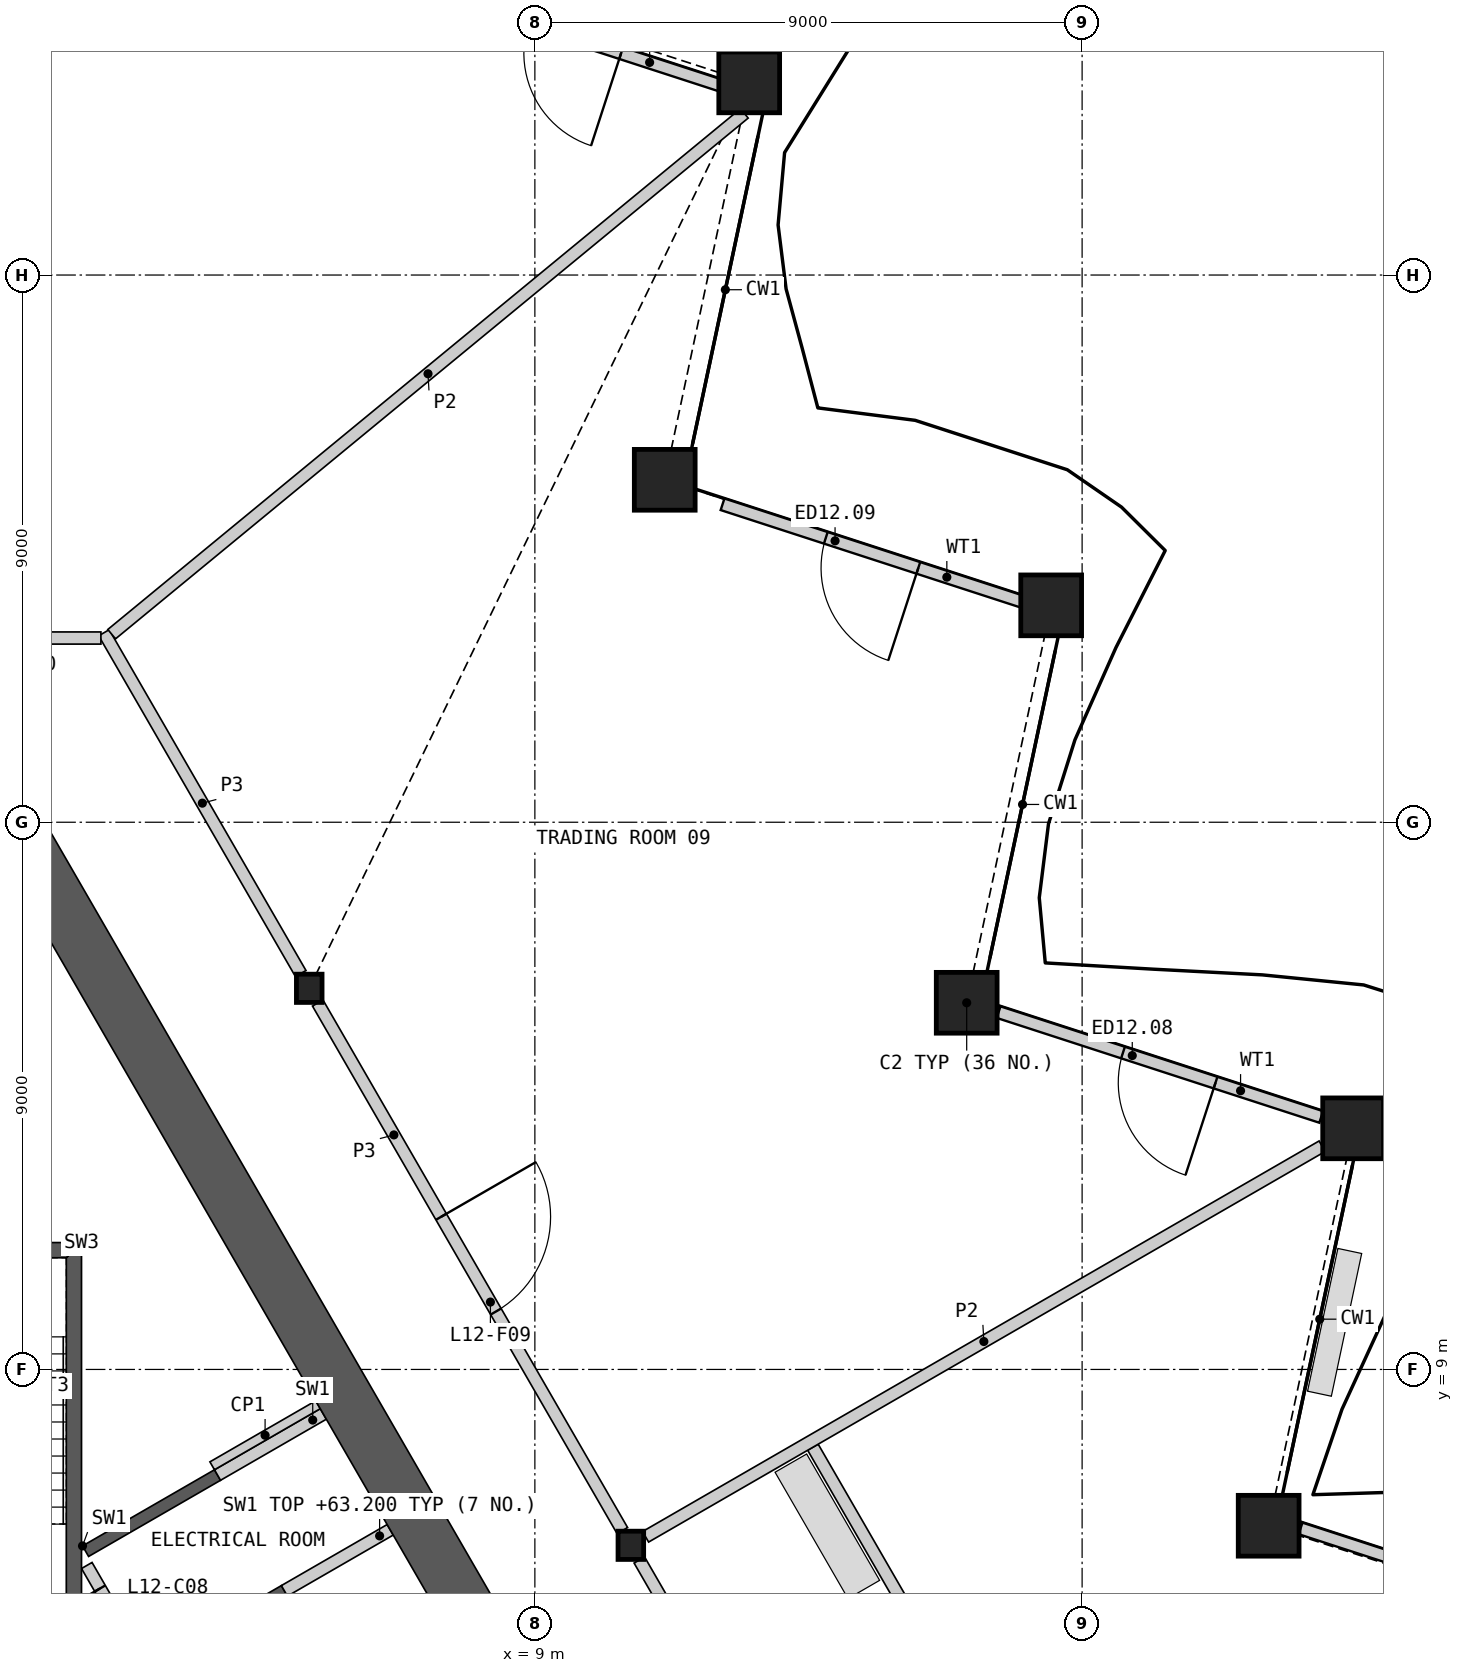
"""IFC4 building model, lengths in metres.
Left out: names, types, materials, properties, quantities, classifications, styles, units other than length and angle.
Written with IfcOpenShell. Run it as: python <this file> out.ifc"""

import sys

from ifc_helpers import new_model, si_unit, direction, frame, frame_2d, origin, origin_2d, place, context, subcontext, project, spatial, polyline, rectangle, hollow_rectangle, i_section, outline, extrude, element, fill, save


model = new_model("IFC4")
c1 = context("Model", 3, precision=1e-05, world=origin(), true_north=direction((0.0, 1.0)))
c2 = subcontext(c1, "Body", "Model", "MODEL_VIEW")
j1 = project(units=[si_unit("LENGTHUNIT", "METRE"), si_unit("PLANEANGLEUNIT", "RADIAN")], contexts=[c1])
p1 = place(None, origin())
s1 = spatial("IfcSite", under=j1, at=p1, CompositionType="ELEMENT")
p2 = place(p1, origin())
s2 = spatial("IfcBuilding", under=s1, at=p2, CompositionType="ELEMENT")
p3 = place(p2, frame((0.0, 0.0, 59.4)))
s3 = spatial("IfcBuildingStorey", under=s2, at=p3, CompositionType="ELEMENT", Elevation=59.4)
for number, where, z_axis, x_axis in (
    (1, (21.068, 6.429, 0.0), (0.0, 0.0, 1.0), (1.0, 0.0, 0.0)),
    (2, (22.457, 12.966, 0.0), (0.0, 0.0, 1.0), (1.0, 0.0, 0.0)),
    (3, (16.102, 15.031, 0.0), (0.0, 0.0, 1.0), (1.0, 0.0, 0.0)),
    (4, (17.491, 21.567, 0.0), (0.0, 0.0, 1.0), (1.0, 0.0, 0.0)),
    (5, (11.136, 23.632, 0.0), (0.0, 0.0, 1.0), (1.0, 0.0, 0.0)),
    (6, (12.525, 30.169, 0.0), (0.0, 0.0, 1.0), (1.0, 0.0, 0.0)),
):
    element("IfcColumn", number, at=place(p3, frame(where, z_axis=z_axis, x_axis=x_axis)), inside=s3, PredefinedType="COLUMN", context=c2, shape_type="SweptSolid", body=[
        extrude(hollow_rectangle(XDim=1.0, YDim=1.0, WallThickness=0.07, at=origin_2d()), origin(), (0.0, 0.0, 1.0), 4.2),
    ])
for number, where, z_axis, x_axis in (
    (7, (10.578, 6.107, 0.0), (0.0, 0.0, 1.0), (1.0, 0.0, 0.0)),
    (8, (5.289, 15.269, 0.0), (0.0, 0.0, 1.0), (1.0, 0.0, 0.0)),
):
    element("IfcColumn", number, at=place(p3, frame(where, z_axis=z_axis, x_axis=x_axis)), inside=s3, PredefinedType="COLUMN", context=c2, shape_type="SweptSolid", body=[
        extrude(i_section(OverallWidth=0.421, OverallDepth=0.465, WebThickness=0.045, FlangeThickness=0.072, at=origin_2d()), origin(), (0.0, 0.0, 1.0), 4.2),
    ])
p4 = place(p3, frame((26.899, 4.661, 0.0), z_axis=(0.0, 0.0, 1.0), x_axis=(-0.951054004345, 0.309024725255, 0.0)))
e9 = element("IfcWall", 9, at=p4, inside=s3, PredefinedType="SOLIDWALL", context=c2, shape_type="SweptSolid", body=[
    extrude(rectangle(XDim=5.579, YDim=0.2, at=frame_2d((2.79, 0.0))), origin(), (0.0, 0.0, 1.0), 3.189),
])
p5 = place(p4, frame((1.91, 0.0, 0.0)))
e10 = element("IfcOpeningElement", 10, at=p5, cuts=e9, PredefinedType="OPENING", context=c2, shape_type="SweptSolid", body=[
    extrude(rectangle(XDim=1.6, YDim=2.4, at=frame_2d((0.8, 1.2))), frame((0.0, 0.11, 0.0), z_axis=(0.0, -1.0, 0.0), x_axis=(1.0, 0.0, 0.0)), (0.0, 0.0, 1.0), 0.22),
])
p6 = place(p3, frame((21.933, 13.153, 0.0), z_axis=(0.0, 0.0, 1.0), x_axis=(-0.951066864375, 0.308985144444, 0.0)))
e11 = element("IfcWall", 11, at=p6, inside=s3, PredefinedType="SOLIDWALL", context=c2, shape_type="SweptSolid", body=[
    extrude(rectangle(XDim=5.579, YDim=0.2, at=frame_2d((2.79, 0.0))), origin(), (0.0, 0.0, 1.0), 3.189),
])
p7 = place(p6, frame((1.828, 0.0, 0.0)))
e12 = element("IfcOpeningElement", 12, at=p7, cuts=e11, PredefinedType="OPENING", context=c2, shape_type="SweptSolid", body=[
    extrude(rectangle(XDim=1.6, YDim=2.4, at=frame_2d((0.8, 1.2))), frame((0.0, 0.11, 0.0), z_axis=(0.0, -1.0, 0.0), x_axis=(1.0, 0.0, 0.0)), (0.0, 0.0, 1.0), 0.22),
])
p8 = place(p3, frame((17.005, 21.631, 0.0), z_axis=(0.0, 0.0, 1.0), x_axis=(-0.951045170621, 0.309051910588, 0.0)))
e13 = element("IfcWall", 13, at=p8, inside=s3, PredefinedType="SOLIDWALL", context=c2, shape_type="SweptSolid", body=[
    extrude(rectangle(XDim=5.171, YDim=0.2, at=frame_2d((2.585, 0.0))), origin(), (0.0, 0.0, 1.0), 3.189),
])
p9 = place(p8, frame((1.786, 0.0, 0.0)))
e14 = element("IfcOpeningElement", 14, at=p9, cuts=e13, PredefinedType="OPENING", context=c2, shape_type="SweptSolid", body=[
    extrude(rectangle(XDim=1.6, YDim=2.4, at=frame_2d((0.8, 1.2))), frame((0.0, 0.11, 0.0), z_axis=(0.0, -1.0, 0.0), x_axis=(1.0, 0.0, 0.0)), (0.0, 0.0, 1.0), 0.22),
])
p10 = place(p3, frame((12.117, 30.097, 0.0), z_axis=(0.0, 0.0, 1.0), x_axis=(-0.951063554534, 0.308995332064, 0.0)))
e15 = element("IfcWall", 15, at=p10, inside=s3, PredefinedType="SOLIDWALL", context=c2, shape_type="SweptSolid", body=[
    extrude(rectangle(XDim=5.171, YDim=0.2, at=frame_2d((2.586, 0.0))), origin(), (0.0, 0.0, 1.0), 3.189),
])
p11 = place(p10, frame((1.786, 0.0, 0.0)))
e16 = element("IfcOpeningElement", 16, at=p11, cuts=e15, PredefinedType="OPENING", context=c2, shape_type="SweptSolid", body=[
    extrude(rectangle(XDim=1.6, YDim=2.4, at=frame_2d((0.8, 1.2))), frame((0.0, 0.11, 0.0), z_axis=(0.0, -1.0, 0.0), x_axis=(1.0, 0.0, 0.0)), (0.0, 0.0, 1.0), 0.22),
])
p12 = place(p3, origin())
e17 = element("IfcWall", 17, at=p12, inside=s3, PredefinedType="SHEAR", context=c2, shape_type="SweptSolid", body=[
    extrude(outline(polyline([(1.561, 6.097), (3.731, 7.35), (3.831, 7.177), (1.66, 5.924), (1.561, 6.097)])), origin(), (0.0, 0.0, 1.0), 3.8),
])
p13 = place(p3, origin())
e18 = element("IfcWall", 18, at=p13, inside=s3, PredefinedType="SHEAR", context=c2, shape_type="SweptSolid", body=[
    extrude(outline(polyline([(2.66, 4.192), (4.831, 5.445), (8.231, -0.444), (6.061, -1.697), (5.96, -1.524), (7.952, -0.374), (6.952, 1.358), (4.96, 0.208), (4.861, 0.381), (6.852, 1.531), (5.852, 3.263), (3.861, 2.113), (3.76, 2.287), (5.752, 3.437), (4.752, 5.169), (2.76, 4.019), (2.66, 4.192)])), origin(), (0.0, 0.0, 1.0), 3.8),
])
p14 = place(p3, frame((5.817, -1.476, 0.0), z_axis=(0.0, 0.0, 1.0), x_axis=(-0.500002616675, 0.866023893041, 0.0)))
e19 = element("IfcWall", 19, at=p14, inside=s3, PredefinedType="SOLIDWALL", context=c2, shape_type="SweptSolid", body=[
    extrude(rectangle(XDim=8.373, YDim=0.2, at=frame_2d((4.187, 0.0))), origin(), (0.0, 0.0, 1.0), 3.8),
])
p15 = place(p14, frame((0.337, 0.0, 0.0)))
e20 = element("IfcOpeningElement", 20, at=p15, cuts=e19, PredefinedType="OPENING", context=c2, shape_type="SweptSolid", body=[
    extrude(rectangle(XDim=1.1, YDim=2.1, at=frame_2d((0.55, 1.05))), frame((0.0, 0.11, 0.0), z_axis=(0.0, -1.0, 0.0), x_axis=(1.0, 0.0, 0.0)), (0.0, 0.0, 1.0), 0.22),
])
p16 = place(p14, frame((2.537, 0.0, 0.0)))
e21 = element("IfcOpeningElement", 21, at=p16, cuts=e19, PredefinedType="OPENING", context=c2, shape_type="SweptSolid", body=[
    extrude(rectangle(XDim=1.1, YDim=2.1, at=frame_2d((0.55, 1.05))), frame((0.0, 0.11, 0.0), z_axis=(0.0, -1.0, 0.0), x_axis=(1.0, 0.0, 0.0)), (0.0, 0.0, 1.0), 0.22),
])
p17 = place(p14, frame((4.737, 0.0, 0.0)))
e22 = element("IfcOpeningElement", 22, at=p17, cuts=e19, PredefinedType="OPENING", context=c2, shape_type="SweptSolid", body=[
    extrude(rectangle(XDim=1.1, YDim=2.1, at=frame_2d((0.55, 1.05))), frame((0.0, 0.11, 0.0), z_axis=(0.0, -1.0, 0.0), x_axis=(1.0, 0.0, 0.0)), (0.0, 0.0, 1.0), 0.22),
])
p18 = place(p14, frame((7.037, 0.0, 0.0)))
e23 = element("IfcOpeningElement", 23, at=p18, cuts=e19, PredefinedType="OPENING", context=c2, shape_type="SweptSolid", body=[
    extrude(rectangle(XDim=0.9, YDim=2.1, at=frame_2d((0.45, 1.05))), frame((0.0, 0.11, 0.0), z_axis=(0.0, -1.0, 0.0), x_axis=(1.0, 0.0, 0.0)), (0.0, 0.0, 1.0), 0.22),
])
p19 = place(p3, frame((4.881, 5.358, 0.0), z_axis=(0.0, 0.0, 1.0), x_axis=(0.866035824272, 0.499981950752, 0.0)))
e24 = element("IfcWall", 24, at=p19, inside=s3, PredefinedType="SHEAR", context=c2, shape_type="SweptSolid", body=[
    extrude(rectangle(XDim=2.009, YDim=0.2, at=frame_2d((1.004, 0.0))), origin(), (0.0, 0.0, 1.0), 3.8),
])
p20 = place(p3, frame((3.781, 7.263, 0.0), z_axis=(0.0, 0.0, 1.0), x_axis=(0.865983199114, 0.50007309351, 0.0)))
e25 = element("IfcWall", 25, at=p20, inside=s3, PredefinedType="SHEAR", context=c2, shape_type="SweptSolid", body=[
    extrude(rectangle(XDim=2.009, YDim=0.2, at=frame_2d((1.004, 0.0))), origin(), (0.0, 0.0, 1.0), 3.8),
])
p21 = place(p3, origin())
e26 = element("IfcWall", 26, at=p21, inside=s3, PredefinedType="SHEAR", context=c2, shape_type="SweptSolid", body=[
    extrude(outline(polyline([(1.544, 5.237), (1.544, 11.087), (1.294, 10.837), (1.294, 5.237), (1.544, 5.237)])), origin(), (0.0, 0.0, 1.0), 3.8),
])
p22 = place(p3, origin())
e27 = element("IfcWall", 27, at=p22, inside=s3, PredefinedType="SHEAR", context=c2, shape_type="SweptSolid", body=[
    extrude(outline(polyline([(1.544, 11.087), (-1.544, 11.087), (-1.294, 10.837), (1.294, 10.837), (1.544, 11.087)])), origin(), (0.0, 0.0, 1.0), 3.8),
])
p23 = place(p3, frame((3.693, 7.415, 0.0), z_axis=(0.0, 0.0, 1.0), x_axis=(0.866035824272, 0.499981950752, 0.0)))
e28 = element("IfcWall", 28, at=p23, inside=s3, PredefinedType="PARTITIONING", context=c2, shape_type="SweptSolid", body=[
    extrude(rectangle(XDim=2.009, YDim=0.15, at=frame_2d((1.004, 0.0))), origin(), (0.0, 0.0, 1.0), 3.8),
])
p24 = place(p3, frame((8.16, 4.596, 0.0), z_axis=(0.0, 0.0, 1.0), x_axis=(-0.500009830349, 0.866019728156, 0.0)))
e29 = element("IfcWall", 29, at=p24, inside=s3, PredefinedType="SHEAR", context=c2, shape_type="SweptSolid", body=[
    extrude(rectangle(XDim=15.541, YDim=0.9, at=frame_2d((7.771, 0.0))), origin(), (0.0, 0.0, 1.0), 3.8),
])
p25 = place(p3, frame((5.429, 15.026, 0.0), z_axis=(0.0, 0.0, 1.0), x_axis=(0.50001002959, -0.86601961312, 0.0)))
e30 = element("IfcWall", 30, at=p25, inside=s3, PredefinedType="PARTITIONING", context=c2, shape_type="SweptSolid", body=[
    extrude(rectangle(XDim=10.019, YDim=0.2, at=frame_2d((5.009, 0.0))), origin(), (0.0, 0.0, 1.0), 3.8),
])
p26 = place(p25, frame((4.059, 0.0, 0.0)))
e31 = element("IfcOpeningElement", 31, at=p26, cuts=e30, PredefinedType="OPENING", context=c2, shape_type="SweptSolid", body=[
    extrude(rectangle(XDim=1.8, YDim=2.1, at=frame_2d((0.9, 1.05))), frame((0.0, 0.11, 0.0), z_axis=(0.0, -1.0, 0.0), x_axis=(1.0, 0.0, 0.0)), (0.0, 0.0, 1.0), 0.22),
])
p27 = place(p3, frame((10.719, 5.865, 0.0), z_axis=(0.0, 0.0, 1.0), x_axis=(0.49999175339, -0.866030164915, 0.0)))
e32 = element("IfcWall", 32, at=p27, inside=s3, PredefinedType="PARTITIONING", context=c2, shape_type="SweptSolid", body=[
    extrude(rectangle(XDim=10.019, YDim=0.2, at=frame_2d((5.009, 0.0))), origin(), (0.0, 0.0, 1.0), 3.8),
])
p28 = place(p27, frame((4.585, 0.0, 0.0)))
e33 = element("IfcOpeningElement", 33, at=p28, cuts=e32, PredefinedType="OPENING", context=c2, shape_type="SweptSolid", body=[
    extrude(rectangle(XDim=0.95, YDim=2.1, at=frame_2d((0.475, 1.05))), frame((0.0, 0.11, 0.0), z_axis=(0.0, -1.0, 0.0), x_axis=(1.0, 0.0, 0.0)), (0.0, 0.0, 1.0), 0.22),
])
p29 = place(p3, frame((1.913, 21.116, 0.0), z_axis=(0.0, 0.0, 1.0), x_axis=(0.500001069878, -0.866024786089, 0.0)))
e34 = element("IfcWall", 34, at=p29, inside=s3, PredefinedType="PARTITIONING", context=c2, shape_type="SweptSolid", body=[
    extrude(rectangle(XDim=6.473, YDim=0.2, at=frame_2d((3.236, 0.0))), origin(), (0.0, 0.0, 1.0), 3.8),
])
p30 = place(p3, frame((-1.863, 21.03, 0.0), z_axis=(0.0, 0.0, 1.0), x_axis=(1.0, 0.0, 0.0)))
e35 = element("IfcWall", 35, at=p30, inside=s3, PredefinedType="PARTITIONING", context=c2, shape_type="SweptSolid", body=[
    extrude(rectangle(XDim=3.726, YDim=0.2, at=frame_2d((1.863, 0.0))), origin(), (0.0, 0.0, 1.0), 3.8),
])
p31 = place(p30, frame((0.963, 0.0, 0.0)))
e36 = element("IfcOpeningElement", 36, at=p31, cuts=e35, PredefinedType="OPENING", context=c2, shape_type="SweptSolid", body=[
    extrude(rectangle(XDim=1.8, YDim=2.1, at=frame_2d((0.9, 1.05))), frame((0.0, 0.11, 0.0), z_axis=(0.0, -1.0, 0.0), x_axis=(1.0, 0.0, 0.0)), (0.0, 0.0, 1.0), 0.22),
])
p32 = place(p3, frame((13.573, 7.721, 0.0), z_axis=(0.0, 0.0, 1.0), x_axis=(0.499990262232, -0.866031025814, 0.0)))
e37 = element("IfcWall", 37, at=p32, inside=s3, PredefinedType="PARTITIONING", context=c2, shape_type="SweptSolid", body=[
    extrude(rectangle(XDim=17.597, YDim=0.2, at=frame_2d((8.799, 0.0))), origin(), (0.0, 0.0, 1.0), 2.885),
])
p33 = place(p32, frame((9.277, 0.0, 0.0)))
e38 = element("IfcOpeningElement", 38, at=p33, cuts=e37, PredefinedType="OPENING", context=c2, shape_type="SweptSolid", body=[
    extrude(rectangle(XDim=0.95, YDim=2.1, at=frame_2d((0.475, 1.05))), frame((0.0, 0.11, 0.0), z_axis=(0.0, -1.0, 0.0), x_axis=(1.0, 0.0, 0.0)), (0.0, 0.0, 1.0), 0.22),
])
p34 = place(p3, frame((2.04, 21.094, 0.0), z_axis=(0.0, 0.0, 1.0), x_axis=(0.772048928551, 0.635563098302, 0.0)))
e39 = element("IfcWall", 39, at=p34, inside=s3, PredefinedType="PARTITIONING", context=c2, shape_type="SweptSolid", body=[
    extrude(rectangle(XDim=13.477, YDim=0.2, at=frame_2d((6.738, 0.0))), origin(), (0.0, 0.0, 1.0), 2.885),
])
p35 = place(p3, frame((10.821, 6.247, 0.0), z_axis=(0.0, 0.0, 1.0), x_axis=(0.866026729935, 0.499997703033, 0.0)))
e40 = element("IfcWall", 40, at=p35, inside=s3, PredefinedType="PARTITIONING", context=c2, shape_type="SweptSolid", body=[
    extrude(rectangle(XDim=12.848, YDim=0.2, at=frame_2d((6.424, 0.0))), origin(), (0.0, 0.0, 1.0), 2.885),
])
p36 = place(p7, origin())
e41 = element("IfcDoor", 41, at=p36, inside=s3, OperationType="DOUBLE_DOOR_SINGLE_SWING", PredefinedType="DOOR", context=c2, shape_type="SweptSolid", body=[
    extrude(rectangle(XDim=1.6, YDim=2.4, at=frame_2d((0.8, 1.2))), frame((0.0, 0.025, 0.0), z_axis=(0.0, -1.0, 0.0), x_axis=(1.0, 0.0, 0.0)), (0.0, 0.0, 1.0), 0.05),
])
fill(e12, e41)
p37 = place(p9, origin())
e42 = element("IfcDoor", 42, at=p37, inside=s3, OperationType="DOUBLE_DOOR_SINGLE_SWING", PredefinedType="DOOR", context=c2, shape_type="SweptSolid", body=[
    extrude(rectangle(XDim=1.6, YDim=2.4, at=frame_2d((0.8, 1.2))), frame((0.0, 0.025, 0.0), z_axis=(0.0, -1.0, 0.0), x_axis=(1.0, 0.0, 0.0)), (0.0, 0.0, 1.0), 0.05),
])
fill(e14, e42)
p38 = place(p11, origin())
e43 = element("IfcDoor", 43, at=p38, inside=s3, OperationType="DOUBLE_DOOR_SINGLE_SWING", PredefinedType="DOOR", context=c2, shape_type="SweptSolid", body=[
    extrude(rectangle(XDim=1.6, YDim=2.4, at=frame_2d((0.8, 1.2))), frame((0.0, 0.025, 0.0), z_axis=(0.0, -1.0, 0.0), x_axis=(1.0, 0.0, 0.0)), (0.0, 0.0, 1.0), 0.05),
])
fill(e16, e43)
p39 = place(p18, origin())
e44 = element("IfcDoor", 44, at=p39, inside=s3, OperationType="SINGLE_SWING_RIGHT", PredefinedType="DOOR", context=c2, shape_type="SweptSolid", body=[
    extrude(rectangle(XDim=0.9, YDim=2.1, at=frame_2d((0.45, 1.05))), frame((0.0, 0.025, 0.0), z_axis=(0.0, -1.0, 0.0), x_axis=(1.0, 0.0, 0.0)), (0.0, 0.0, 1.0), 0.05),
])
fill(e23, e44)
p40 = place(p26, origin())
e45 = element("IfcDoor", 45, at=p40, inside=s3, OperationType="DOUBLE_DOOR_SINGLE_SWING", PredefinedType="DOOR", context=c2, shape_type="SweptSolid", body=[
    extrude(rectangle(XDim=1.8, YDim=2.1, at=frame_2d((0.9, 1.05))), frame((0.0, 0.025, 0.0), z_axis=(0.0, -1.0, 0.0), x_axis=(1.0, 0.0, 0.0)), (0.0, 0.0, 1.0), 0.05),
])
fill(e31, e45)
save(model, sys.argv[1])
